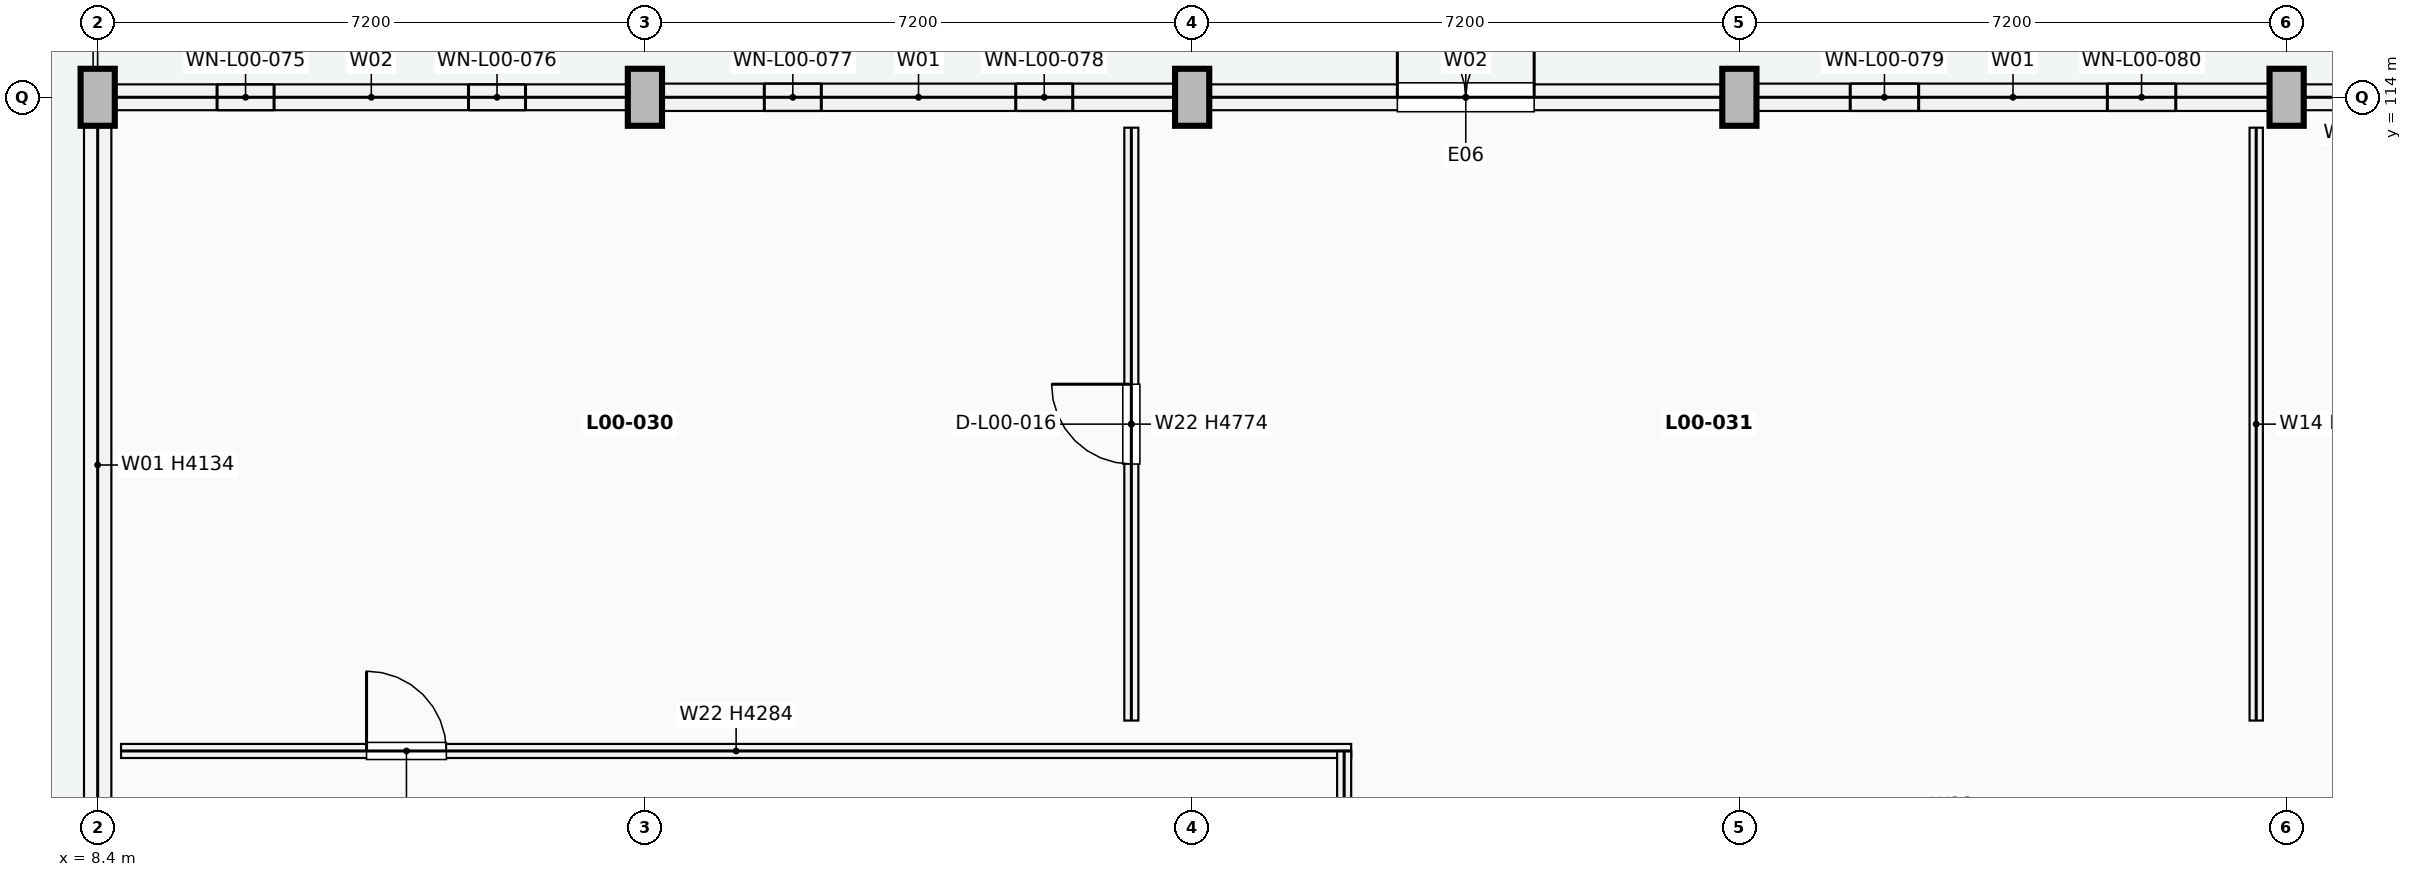
"""IFC4 building model, lengths in metres.
Left out: names, types, materials, properties, quantities, classifications, styles, units other than length and angle.
Written with IfcOpenShell. Run it as: python <this file> out.ifc"""

import sys

from ifc_helpers import new_model, si_unit, direction, frame, frame_2d, origin, origin_2d, place, context, subcontext, project, spatial, rectangle, extrude, element, fill, save


model = new_model("IFC4")
c1 = context("Model", 3, precision=1e-05, world=origin(), true_north=direction((0.0, 1.0)))
c2 = subcontext(c1, "Body", "Model", "MODEL_VIEW")
j1 = project(units=[si_unit("LENGTHUNIT", "METRE"), si_unit("PLANEANGLEUNIT", "RADIAN")], contexts=[c1])
p1 = place(None, origin())
s1 = spatial("IfcSite", under=j1, at=p1, CompositionType="ELEMENT")
p2 = place(p1, origin())
s2 = spatial("IfcBuilding", under=s1, at=p2, CompositionType="ELEMENT")
p3 = place(p2, origin())
s3 = spatial("IfcBuildingStorey", under=s2, at=p3, CompositionType="ELEMENT", Elevation=0.0)
for number, where, z_axis, x_axis in (
    (1, (8.4, 114.0, 0.0), (0.0, 0.0, 1.0), (1.0, 0.0, 0.0)),
    (2, (15.6, 114.0, 0.0), (0.0, 0.0, 1.0), (1.0, 0.0, 0.0)),
    (3, (22.8, 114.0, 0.0), (0.0, 0.0, 1.0), (1.0, 0.0, 0.0)),
    (4, (30.0, 114.0, 0.0), (0.0, 0.0, 1.0), (1.0, 0.0, 0.0)),
    (5, (37.2, 114.0, 0.0), (0.0, 0.0, 1.0), (1.0, 0.0, 0.0)),
):
    element("IfcColumn", number, at=place(p3, frame(where, z_axis=z_axis, x_axis=x_axis)), inside=s3, PredefinedType="PILASTER", context=c2, shape_type="SweptSolid", body=[
        extrude(rectangle(XDim=0.45, YDim=0.75, at=origin_2d()), origin(), (0.0, 0.0, 1.0), 5.1),
    ])
p4 = place(p3, frame((8.4, 104.702, 0.0), z_axis=(0.0, 0.0, 1.0), x_axis=(0.0, 1.0, 0.0)))
e6 = element("IfcWall", 6, at=p4, inside=s3, PredefinedType="SOLIDWALL", context=c2, shape_type="SweptSolid", body=[
    extrude(rectangle(XDim=8.921, YDim=0.36, at=frame_2d((4.46, 0.0))), origin(), (0.0, 0.0, 1.0), 4.134),
])
p5 = place(p3, frame((8.627, 114.0, 0.0), z_axis=(0.0, 0.0, 1.0), x_axis=(1.0, 0.0, 0.0)))
e7 = element("IfcWall", 7, at=p5, inside=s3, PredefinedType="SOLIDWALL", context=c2, shape_type="SweptSolid", body=[
    extrude(rectangle(XDim=6.746, YDim=0.34, at=frame_2d((3.373, 0.0))), origin(), (0.0, 0.0, 1.0), 4.284),
])
p6 = place(p5, frame((1.344, 0.0, 0.75)))
e8 = element("IfcOpeningElement", 8, at=p6, cuts=e7, PredefinedType="OPENING", context=c2, shape_type="SweptSolid", body=[
    extrude(rectangle(XDim=0.75, YDim=2.1, at=frame_2d((0.375, 1.05))), frame((0.0, 0.18, 0.0), z_axis=(0.0, -1.0, 0.0), x_axis=(1.0, 0.0, 0.0)), (0.0, 0.0, 1.0), 0.36),
])
p7 = place(p5, frame((4.652, 0.0, 0.75)))
e9 = element("IfcOpeningElement", 9, at=p7, cuts=e7, PredefinedType="OPENING", context=c2, shape_type="SweptSolid", body=[
    extrude(rectangle(XDim=0.75, YDim=2.1, at=frame_2d((0.375, 1.05))), frame((0.0, 0.18, 0.0), z_axis=(0.0, -1.0, 0.0), x_axis=(1.0, 0.0, 0.0)), (0.0, 0.0, 1.0), 0.36),
])
p8 = place(p3, frame((15.827, 114.0, 0.0), z_axis=(0.0, 0.0, 1.0), x_axis=(1.0, 0.0, 0.0)))
e10 = element("IfcWall", 10, at=p8, inside=s3, PredefinedType="SOLIDWALL", context=c2, shape_type="SweptSolid", body=[
    extrude(rectangle(XDim=6.746, YDim=0.36, at=frame_2d((3.373, 0.0))), origin(), (0.0, 0.0, 1.0), 4.284),
])
p9 = place(p8, frame((1.344, 0.0, 0.75)))
e11 = element("IfcOpeningElement", 11, at=p9, cuts=e10, PredefinedType="OPENING", context=c2, shape_type="SweptSolid", body=[
    extrude(rectangle(XDim=0.75, YDim=1.7, at=frame_2d((0.375, 0.85))), frame((0.0, 0.19, 0.0), z_axis=(0.0, -1.0, 0.0), x_axis=(1.0, 0.0, 0.0)), (0.0, 0.0, 1.0), 0.38),
])
p10 = place(p8, frame((4.652, 0.0, 0.75)))
e12 = element("IfcOpeningElement", 12, at=p10, cuts=e10, PredefinedType="OPENING", context=c2, shape_type="SweptSolid", body=[
    extrude(rectangle(XDim=0.75, YDim=1.7, at=frame_2d((0.375, 0.85))), frame((0.0, 0.19, 0.0), z_axis=(0.0, -1.0, 0.0), x_axis=(1.0, 0.0, 0.0)), (0.0, 0.0, 1.0), 0.38),
])
p11 = place(p3, frame((23.027, 114.0, 0.0), z_axis=(0.0, 0.0, 1.0), x_axis=(1.0, 0.0, 0.0)))
e13 = element("IfcWall", 13, at=p11, inside=s3, PredefinedType="SOLIDWALL", context=c2, shape_type="SweptSolid", body=[
    extrude(rectangle(XDim=6.746, YDim=0.34, at=frame_2d((3.373, 0.0))), origin(), (0.0, 0.0, 1.0), 4.284),
])
p12 = place(p11, frame((2.473, 0.0, 0.0)))
e14 = element("IfcOpeningElement", 14, at=p12, cuts=e13, PredefinedType="OPENING", context=c2, shape_type="SweptSolid", body=[
    extrude(rectangle(XDim=1.8, YDim=2.4, at=frame_2d((0.9, 1.2))), frame((0.0, 0.18, 0.0), z_axis=(0.0, -1.0, 0.0), x_axis=(1.0, 0.0, 0.0)), (0.0, 0.0, 1.0), 0.36),
])
p13 = place(p3, frame((30.227, 114.0, 0.0), z_axis=(0.0, 0.0, 1.0), x_axis=(1.0, 0.0, 0.0)))
e15 = element("IfcWall", 15, at=p13, inside=s3, PredefinedType="SOLIDWALL", context=c2, shape_type="SweptSolid", body=[
    extrude(rectangle(XDim=6.746, YDim=0.36, at=frame_2d((3.373, 0.0))), origin(), (0.0, 0.0, 1.0), 4.284),
])
p14 = place(p13, frame((1.231, 0.0, 0.75)))
e16 = element("IfcOpeningElement", 16, at=p14, cuts=e15, PredefinedType="OPENING", context=c2, shape_type="SweptSolid", body=[
    extrude(rectangle(XDim=0.9, YDim=2.35, at=frame_2d((0.45, 1.175))), frame((0.0, 0.19, 0.0), z_axis=(0.0, -1.0, 0.0), x_axis=(1.0, 0.0, 0.0)), (0.0, 0.0, 1.0), 0.38),
])
p15 = place(p13, frame((4.615, 0.0, 0.75)))
e17 = element("IfcOpeningElement", 17, at=p15, cuts=e15, PredefinedType="OPENING", context=c2, shape_type="SweptSolid", body=[
    extrude(rectangle(XDim=0.9, YDim=2.35, at=frame_2d((0.45, 1.175))), frame((0.0, 0.19, 0.0), z_axis=(0.0, -1.0, 0.0), x_axis=(1.0, 0.0, 0.0)), (0.0, 0.0, 1.0), 0.38),
])
p16 = place(p3, frame((37.427, 114.0, 0.0), z_axis=(0.0, 0.0, 1.0), x_axis=(1.0, 0.0, 0.0)))
e18 = element("IfcWall", 18, at=p16, inside=s3, PredefinedType="SOLIDWALL", context=c2, shape_type="SweptSolid", body=[
    extrude(rectangle(XDim=3.146, YDim=0.34, at=frame_2d((1.573, 0.0))), origin(), (0.0, 0.0, 1.0), 4.284),
])
p17 = place(p16, frame((0.595, 0.0, 0.75)))
e19 = element("IfcOpeningElement", 19, at=p17, cuts=e18, PredefinedType="OPENING", context=c2, shape_type="SweptSolid", body=[
    extrude(rectangle(XDim=0.9, YDim=1.95, at=frame_2d((0.45, 0.975))), frame((0.0, 0.18, 0.0), z_axis=(0.0, -1.0, 0.0), x_axis=(1.0, 0.0, 0.0)), (0.0, 0.0, 1.0), 0.36),
])
p18 = place(p3, frame((8.708, 105.4, 0.0), z_axis=(0.0, 0.0, 1.0), x_axis=(1.0, 0.0, 0.0)))
e20 = element("IfcWall", 20, at=p18, inside=s3, PredefinedType="PARTITIONING", context=c2, shape_type="SweptSolid", body=[
    extrude(rectangle(XDim=16.185, YDim=0.185, at=frame_2d((8.093, 0.0))), origin(), (0.0, 0.0, 1.0), 4.284),
])
p19 = place(p18, frame((3.23, 0.0, 0.0)))
e21 = element("IfcOpeningElement", 21, at=p19, cuts=e20, PredefinedType="OPENING", context=c2, shape_type="SweptSolid", body=[
    extrude(rectangle(XDim=1.05, YDim=2.15, at=frame_2d((0.525, 1.075))), frame((0.0, 0.103, 0.0), z_axis=(0.0, -1.0, 0.0), x_axis=(1.0, 0.0, 0.0)), (0.0, 0.0, 1.0), 0.205),
])
p20 = place(p3, frame((24.8, 92.6, 0.0), z_axis=(0.0, 0.0, 1.0), x_axis=(0.0, 1.0, 0.0)))
e22 = element("IfcWall", 22, at=p20, inside=s3, PredefinedType="PARTITIONING", context=c2, shape_type="SweptSolid", body=[
    extrude(rectangle(XDim=12.8, YDim=0.185, at=frame_2d((6.4, 0.0))), origin(), (0.0, 0.0, 1.0), 4.134),
])
p21 = place(p3, frame((22.0, 105.8, 0.0), z_axis=(0.0, 0.0, 1.0), x_axis=(0.0, 1.0, 0.0)))
e23 = element("IfcWall", 23, at=p21, inside=s3, PredefinedType="PARTITIONING", context=c2, shape_type="SweptSolid", body=[
    extrude(rectangle(XDim=7.8, YDim=0.185, at=frame_2d((3.9, 0.0))), origin(), (0.0, 0.0, 1.0), 4.774),
])
p22 = place(p21, frame((3.375, 0.0, 0.0)))
e24 = element("IfcOpeningElement", 24, at=p22, cuts=e23, PredefinedType="OPENING", context=c2, shape_type="SweptSolid", body=[
    extrude(rectangle(XDim=1.05, YDim=2.15, at=frame_2d((0.525, 1.075))), frame((0.0, 0.103, 0.0), z_axis=(0.0, -1.0, 0.0), x_axis=(1.0, 0.0, 0.0)), (0.0, 0.0, 1.0), 0.205),
])
p23 = place(p3, frame((36.8, 105.8, 0.0), z_axis=(0.0, 0.0, 1.0), x_axis=(0.0, 1.0, 0.0)))
e25 = element("IfcWall", 25, at=p23, inside=s3, PredefinedType="PARTITIONING", context=c2, shape_type="SweptSolid", body=[
    extrude(rectangle(XDim=7.8, YDim=0.175, at=frame_2d((3.9, 0.0))), origin(), (0.0, 0.0, 1.0), 4.774),
])
p24 = place(p6, origin())
e26 = element("IfcWindow", 26, at=p24, inside=s3, PartitioningType="SINGLE_PANEL", PredefinedType="WINDOW", context=c2, shape_type="SweptSolid", body=[
    extrude(rectangle(XDim=0.75, YDim=2.1, at=frame_2d((0.375, 1.05))), frame((0.0, 0.03, 0.0), z_axis=(0.0, -1.0, 0.0), x_axis=(1.0, 0.0, 0.0)), (0.0, 0.0, 1.0), 0.06),
])
fill(e8, e26)
p25 = place(p7, origin())
e27 = element("IfcWindow", 27, at=p25, inside=s3, PartitioningType="SINGLE_PANEL", PredefinedType="WINDOW", context=c2, shape_type="SweptSolid", body=[
    extrude(rectangle(XDim=0.75, YDim=2.1, at=frame_2d((0.375, 1.05))), frame((0.0, 0.03, 0.0), z_axis=(0.0, -1.0, 0.0), x_axis=(1.0, 0.0, 0.0)), (0.0, 0.0, 1.0), 0.06),
])
fill(e9, e27)
p26 = place(p9, origin())
e28 = element("IfcWindow", 28, at=p26, inside=s3, PartitioningType="SINGLE_PANEL", PredefinedType="WINDOW", context=c2, shape_type="SweptSolid", body=[
    extrude(rectangle(XDim=0.75, YDim=1.7, at=frame_2d((0.375, 0.85))), frame((0.0, 0.03, 0.0), z_axis=(0.0, -1.0, 0.0), x_axis=(1.0, 0.0, 0.0)), (0.0, 0.0, 1.0), 0.06),
])
fill(e11, e28)
p27 = place(p10, origin())
e29 = element("IfcWindow", 29, at=p27, inside=s3, PartitioningType="SINGLE_PANEL", PredefinedType="WINDOW", context=c2, shape_type="SweptSolid", body=[
    extrude(rectangle(XDim=0.75, YDim=1.7, at=frame_2d((0.375, 0.85))), frame((0.0, 0.03, 0.0), z_axis=(0.0, -1.0, 0.0), x_axis=(1.0, 0.0, 0.0)), (0.0, 0.0, 1.0), 0.06),
])
fill(e12, e29)
p28 = place(p12, origin())
e30 = element("IfcDoor", 30, at=p28, inside=s3, OperationType="DOUBLE_DOOR_SINGLE_SWING", PredefinedType="DOOR", context=c2, shape_type="SweptSolid", body=[
    extrude(rectangle(XDim=1.8, YDim=2.4, at=frame_2d((0.9, 1.2))), frame((0.0, 0.025, 0.0), z_axis=(0.0, -1.0, 0.0), x_axis=(1.0, 0.0, 0.0)), (0.0, 0.0, 1.0), 0.05),
])
fill(e14, e30)
p29 = place(p14, origin())
e31 = element("IfcWindow", 31, at=p29, inside=s3, PartitioningType="SINGLE_PANEL", PredefinedType="WINDOW", context=c2, shape_type="SweptSolid", body=[
    extrude(rectangle(XDim=0.9, YDim=2.35, at=frame_2d((0.45, 1.175))), frame((0.0, 0.03, 0.0), z_axis=(0.0, -1.0, 0.0), x_axis=(1.0, 0.0, 0.0)), (0.0, 0.0, 1.0), 0.06),
])
fill(e16, e31)
p30 = place(p15, origin())
e32 = element("IfcWindow", 32, at=p30, inside=s3, PartitioningType="SINGLE_PANEL", PredefinedType="WINDOW", context=c2, shape_type="SweptSolid", body=[
    extrude(rectangle(XDim=0.9, YDim=2.35, at=frame_2d((0.45, 1.175))), frame((0.0, 0.03, 0.0), z_axis=(0.0, -1.0, 0.0), x_axis=(1.0, 0.0, 0.0)), (0.0, 0.0, 1.0), 0.06),
])
fill(e17, e32)
p31 = place(p19, origin())
e33 = element("IfcDoor", 33, at=p31, inside=s3, OperationType="SINGLE_SWING_LEFT", PredefinedType="DOOR", context=c2, shape_type="SweptSolid", body=[
    extrude(rectangle(XDim=1.05, YDim=2.15, at=frame_2d((0.525, 1.075))), frame((0.0, 0.025, 0.0), z_axis=(0.0, -1.0, 0.0), x_axis=(1.0, 0.0, 0.0)), (0.0, 0.0, 1.0), 0.05),
])
fill(e21, e33)
p32 = place(p22, origin())
e34 = element("IfcDoor", 34, at=p32, inside=s3, OperationType="SINGLE_SWING_RIGHT", PredefinedType="DOOR", context=c2, shape_type="SweptSolid", body=[
    extrude(rectangle(XDim=1.05, YDim=2.15, at=frame_2d((0.525, 1.075))), frame((0.0, 0.025, 0.0), z_axis=(0.0, -1.0, 0.0), x_axis=(1.0, 0.0, 0.0)), (0.0, 0.0, 1.0), 0.05),
])
fill(e24, e34)
save(model, sys.argv[1])
